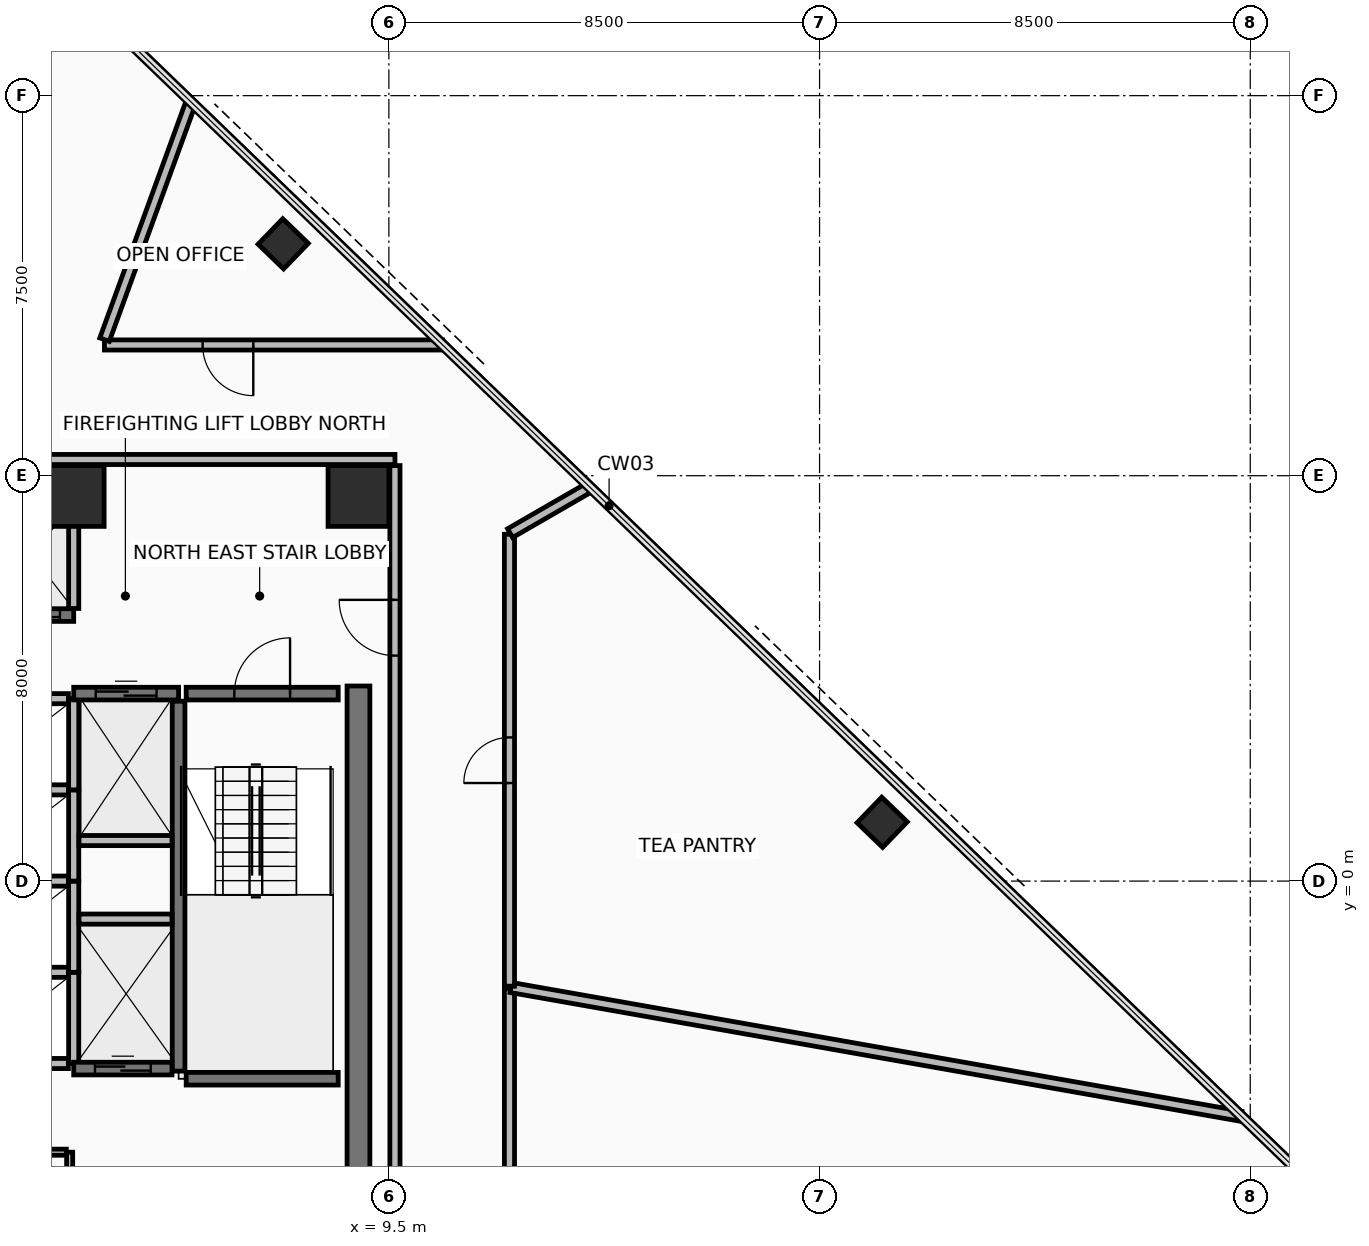
"""IFC4 building model, lengths in metres.
Left out: names, types, materials, properties, quantities, classifications, styles, units other than length and angle.
Written with IfcOpenShell. Run it as: python <this file> out.ifc"""

import sys

from ifc_helpers import new_model, si_unit, direction, frame, frame_2d, origin, origin_2d, place, context, subcontext, project, spatial, rectangle, hollow_rectangle, extrude, element, fill, save


model = new_model("IFC4")
c1 = context("Model", 3, precision=1e-05, world=origin(), true_north=direction((0.0, 1.0)))
c2 = subcontext(c1, "Body", "Model", "MODEL_VIEW")
j1 = project(units=[si_unit("LENGTHUNIT", "METRE"), si_unit("PLANEANGLEUNIT", "RADIAN")], contexts=[c1])
p1 = place(None, origin())
s1 = spatial("IfcSite", under=j1, at=p1, CompositionType="ELEMENT")
p2 = place(p1, origin())
s2 = spatial("IfcBuilding", under=s1, at=p2, CompositionType="ELEMENT")
p3 = place(p2, frame((0.0, 0.0, 89.7)))
s3 = spatial("IfcBuildingStorey", under=s2, at=p3, CompositionType="ELEMENT", Elevation=89.7)
for number, where, z_axis, x_axis in (
    (1, (8.9, 7.6, 0.0), (0.0, 0.0, 1.0), (1.0, 0.0, 0.0)),
    (2, (3.28, 7.6, 0.0), (0.0, 0.0, 1.0), (1.0, 0.0, 0.0)),
):
    element("IfcColumn", number, at=place(p3, frame(where, z_axis=z_axis, x_axis=x_axis)), inside=s3, PredefinedType="COLUMN", context=c2, shape_type="SweptSolid", body=[
        extrude(rectangle(XDim=1.2, YDim=1.2, at=origin_2d()), origin(), (0.0, 0.0, 1.0), 3.6),
    ])
for number, where, z_axis, x_axis in (
    (3, (19.236, 1.16, 0.0), (0.0, 0.0, 1.0), (-0.719, 0.695, 0.0)),
    (4, (7.415, 12.576, 0.0), (0.0, 0.0, 1.0), (-0.719, 0.695, 0.0)),
):
    element("IfcColumn", number, at=place(p3, frame(where, z_axis=z_axis, x_axis=x_axis)), inside=s3, PredefinedType="COLUMN", context=c2, shape_type="SweptSolid", body=[
        extrude(hollow_rectangle(XDim=0.7, YDim=0.7, WallThickness=0.04, at=origin_2d()), origin(), (0.0, 0.0, 1.0), 3.6),
    ])
p4 = place(p3, frame((8.9, -6.85, 0.0), z_axis=(0.0, 0.0, 1.0), x_axis=(0.0, 1.0, 0.0)))
e5 = element("IfcWall", 5, at=p4, inside=s3, PredefinedType="SHEAR", context=c2, shape_type="SweptSolid", body=[
    extrude(rectangle(XDim=10.7, YDim=0.45, at=frame_2d((5.35, 0.0))), origin(), (0.0, 0.0, 1.0), 3.41),
])
p5 = place(p3, frame((9.62, 8.32, 0.0), z_axis=(0.0, 0.0, 1.0), x_axis=(-1.0, 0.0, 0.0)))
e6 = element("IfcWall", 6, at=p5, inside=s3, PredefinedType="PARTITIONING", context=c2, shape_type="SweptSolid", body=[
    extrude(rectangle(XDim=19.24, YDim=0.2, at=frame_2d((9.62, 0.0))), origin(), (0.0, 0.0, 1.0), 2.755),
])
p6 = place(p5, frame((15.02, 0.0, 0.0)))
e7 = element("IfcOpeningElement", 7, at=p6, cuts=e6, PredefinedType="OPENING", context=c2, shape_type="SweptSolid", body=[
    extrude(rectangle(XDim=0.9, YDim=2.1, at=frame_2d((0.45, 1.05))), frame((0.0, 0.11, 0.0), z_axis=(0.0, -1.0, 0.0), x_axis=(1.0, 0.0, 0.0)), (0.0, 0.0, 1.0), 0.22),
])
p7 = place(p3, frame((9.62, -8.2, 0.0), z_axis=(0.0, 0.0, 1.0), x_axis=(0.0, 1.0, 0.0)))
e8 = element("IfcWall", 8, at=p7, inside=s3, PredefinedType="PARTITIONING", context=c2, shape_type="SweptSolid", body=[
    extrude(rectangle(XDim=16.4, YDim=0.2, at=frame_2d((8.2, 0.0))), origin(), (0.0, 0.0, 1.0), 2.805),
])
p8 = place(p7, frame((12.65, 0.0, 0.0)))
e9 = element("IfcOpeningElement", 9, at=p8, cuts=e8, PredefinedType="OPENING", context=c2, shape_type="SweptSolid", body=[
    extrude(rectangle(XDim=1.1, YDim=2.15, at=frame_2d((0.55, 1.075))), frame((0.0, 0.11, 0.0), z_axis=(0.0, -1.0, 0.0), x_axis=(1.0, 0.0, 0.0)), (0.0, 0.0, 1.0), 0.22),
])
p9 = place(p3, frame((5.35, -3.75, 0.0), z_axis=(0.0, 0.0, 1.0), x_axis=(0.0, 1.0, 0.0)))
e10 = element("IfcWall", 10, at=p9, inside=s3, PredefinedType="SHEAR", context=c2, shape_type="SweptSolid", body=[
    extrude(rectangle(XDim=7.3, YDim=0.25, at=frame_2d((3.65, 0.0))), origin(), (0.0, 0.0, 1.0), 3.41),
])
p10 = place(p3, frame((5.5, 3.7, 0.0), z_axis=(0.0, 0.0, 1.0), x_axis=(1.0, 0.0, 0.0)))
e11 = element("IfcWall", 11, at=p10, inside=s3, PredefinedType="SHEAR", context=c2, shape_type="SweptSolid", body=[
    extrude(rectangle(XDim=3.0, YDim=0.25, at=frame_2d((1.5, 0.0))), origin(), (0.0, 0.0, 1.0), 3.41),
])
p11 = place(p10, frame((0.95, 0.0, 0.0)))
e12 = element("IfcOpeningElement", 12, at=p11, cuts=e11, PredefinedType="OPENING", context=c2, shape_type="SweptSolid", body=[
    extrude(rectangle(XDim=1.1, YDim=2.15, at=frame_2d((0.55, 1.075))), frame((0.0, 0.135, 0.0), z_axis=(0.0, -1.0, 0.0), x_axis=(1.0, 0.0, 0.0)), (0.0, 0.0, 1.0), 0.27),
])
p12 = place(p3, frame((5.5, -3.9, 0.0), z_axis=(0.0, 0.0, 1.0), x_axis=(1.0, 0.0, 0.0)))
e13 = element("IfcWall", 13, at=p12, inside=s3, PredefinedType="SHEAR", context=c2, shape_type="SweptSolid", body=[
    extrude(rectangle(XDim=3.0, YDim=0.25, at=frame_2d((1.5, 0.0))), origin(), (0.0, 0.0, 1.0), 3.41),
])
p13 = place(p3, frame((1.637, 5.25, 0.0), z_axis=(0.0, 0.0, 1.0), x_axis=(1.0, 0.0, 0.0)))
e14 = element("IfcWall", 14, at=p13, inside=s3, PredefinedType="SHEAR", context=c2, shape_type="SweptSolid", body=[
    extrude(rectangle(XDim=1.643, YDim=0.25, at=frame_2d((0.821, 0.0))), origin(), (0.0, 0.0, 1.0), 3.41),
])
p14 = place(p13, frame((0.271, 0.0, 0.0)))
e15 = element("IfcOpeningElement", 15, at=p14, cuts=e14, PredefinedType="OPENING", context=c2, shape_type="SweptSolid", body=[
    extrude(rectangle(XDim=1.1, YDim=2.2, at=frame_2d((0.55, 1.1))), frame((0.0, 0.135, 0.0), z_axis=(0.0, -1.0, 0.0), x_axis=(1.0, 0.0, 0.0)), (0.0, 0.0, 1.0), 0.27),
])
p15 = place(p3, frame((2.58, 7.6, 0.0), z_axis=(0.0, 0.0, 1.0), x_axis=(1.0, 0.0, 0.0)))
e16 = element("IfcWall", 16, at=p15, inside=s3, PredefinedType="PARTITIONING", context=c2, shape_type="SweptSolid", body=[
    extrude(rectangle(XDim=0.7, YDim=0.2, at=frame_2d((0.35, 0.0))), origin(), (0.0, 0.0, 1.0), 2.605),
])
p16 = place(p3, frame((3.28, 5.38, 0.0), z_axis=(0.0, 0.0, 1.0), x_axis=(0.0, 1.0, 0.0)))
e17 = element("IfcWall", 17, at=p16, inside=s3, PredefinedType="PARTITIONING", context=c2, shape_type="SweptSolid", body=[
    extrude(rectangle(XDim=2.115, YDim=0.2, at=frame_2d((1.058, 0.0))), origin(), (0.0, 0.0, 1.0), 2.605),
])
p17 = place(p3, frame((3.28, -3.6, 0.0), z_axis=(0.0, 0.0, 1.0), x_axis=(0.0, 1.0, 0.0)))
e18 = element("IfcWall", 18, at=p17, inside=s3, PredefinedType="PARTITIONING", context=c2, shape_type="SweptSolid", body=[
    extrude(rectangle(XDim=1.8, YDim=0.2, at=frame_2d((0.9, 0.0))), origin(), (0.0, 0.0, 1.0), 3.41),
])
for number, where, z_axis, x_axis in (
    (19, (1.13, -3.6, 0.0), (0.0, 0.0, 1.0), (1.0, 0.0, 0.0)),
    (20, (1.13, -1.8, 0.0), (0.0, 0.0, 1.0), (1.0, 0.0, 0.0)),
):
    element("IfcWall", number, at=place(p3, frame(where, z_axis=z_axis, x_axis=x_axis)), inside=s3, PredefinedType="PARTITIONING", context=c2, shape_type="SweptSolid", body=[
        extrude(rectangle(XDim=2.045, YDim=0.2, at=frame_2d((1.022, 0.0))), origin(), (0.0, 0.0, 1.0), 3.41),
    ])
p18 = place(p3, frame((3.28, -1.8, 0.0), z_axis=(0.0, 0.0, 1.0), x_axis=(0.0, 1.0, 0.0)))
e21 = element("IfcWall", 21, at=p18, inside=s3, PredefinedType="PARTITIONING", context=c2, shape_type="SweptSolid", body=[
    extrude(rectangle(XDim=1.8, YDim=0.2, at=frame_2d((0.9, 0.0))), origin(), (0.0, 0.0, 1.0), 3.41),
])
p19 = place(p3, frame((1.13, 0.0, 0.0), z_axis=(0.0, 0.0, 1.0), x_axis=(1.0, 0.0, 0.0)))
e22 = element("IfcWall", 22, at=p19, inside=s3, PredefinedType="PARTITIONING", context=c2, shape_type="SweptSolid", body=[
    extrude(rectangle(XDim=2.045, YDim=0.2, at=frame_2d((1.022, 0.0))), origin(), (0.0, 0.0, 1.0), 3.41),
])
p20 = place(p3, frame((3.28, 0.0, 0.0), z_axis=(0.0, 0.0, 1.0), x_axis=(0.0, 1.0, 0.0)))
e23 = element("IfcWall", 23, at=p20, inside=s3, PredefinedType="PARTITIONING", context=c2, shape_type="SweptSolid", body=[
    extrude(rectangle(XDim=1.8, YDim=0.2, at=frame_2d((0.9, 0.0))), origin(), (0.0, 0.0, 1.0), 3.41),
])
p21 = place(p3, frame((1.13, 1.8, 0.0), z_axis=(0.0, 0.0, 1.0), x_axis=(1.0, 0.0, 0.0)))
e24 = element("IfcWall", 24, at=p21, inside=s3, PredefinedType="PARTITIONING", context=c2, shape_type="SweptSolid", body=[
    extrude(rectangle(XDim=2.045, YDim=0.2, at=frame_2d((1.022, 0.0))), origin(), (0.0, 0.0, 1.0), 3.41),
])
p22 = place(p3, frame((3.28, 1.8, 0.0), z_axis=(0.0, 0.0, 1.0), x_axis=(0.0, 1.0, 0.0)))
e25 = element("IfcWall", 25, at=p22, inside=s3, PredefinedType="PARTITIONING", context=c2, shape_type="SweptSolid", body=[
    extrude(rectangle(XDim=1.8, YDim=0.2, at=frame_2d((0.9, 0.0))), origin(), (0.0, 0.0, 1.0), 3.41),
])
p23 = place(p3, frame((1.13, 3.6, 0.0), z_axis=(0.0, 0.0, 1.0), x_axis=(1.0, 0.0, 0.0)))
e26 = element("IfcWall", 26, at=p23, inside=s3, PredefinedType="PARTITIONING", context=c2, shape_type="SweptSolid", body=[
    extrude(rectangle(XDim=2.045, YDim=0.2, at=frame_2d((1.022, 0.0))), origin(), (0.0, 0.0, 1.0), 2.605),
])
p24 = place(p3, frame((3.28, 3.7, 0.0), z_axis=(0.0, 0.0, 1.0), x_axis=(1.0, 0.0, 0.0)))
e27 = element("IfcWall", 27, at=p24, inside=s3, PredefinedType="SHEAR", context=c2, shape_type="SweptSolid", body=[
    extrude(rectangle(XDim=2.07, YDim=0.25, at=frame_2d((1.035, 0.0))), origin(), (0.0, 0.0, 1.0), 3.41),
])
p25 = place(p24, frame((0.435, 0.0, 0.0)))
e28 = element("IfcOpeningElement", 28, at=p25, cuts=e27, PredefinedType="OPENING", context=c2, shape_type="SweptSolid", body=[
    extrude(rectangle(XDim=1.2, YDim=2.2, at=frame_2d((0.6, 1.1))), frame((0.0, 0.135, 0.0), z_axis=(0.0, -1.0, 0.0), x_axis=(1.0, 0.0, 0.0)), (0.0, 0.0, 1.0), 0.27),
])
p26 = place(p3, frame((3.385, 0.8, 0.0), z_axis=(0.0, 0.0, 1.0), x_axis=(1.0, 0.0, 0.0)))
e29 = element("IfcWall", 29, at=p26, inside=s3, PredefinedType="PARTITIONING", context=c2, shape_type="SweptSolid", body=[
    extrude(rectangle(XDim=1.835, YDim=0.2, at=frame_2d((0.917, 0.0))), origin(), (0.0, 0.0, 1.0), 3.41),
])
p27 = place(p3, frame((3.28, -3.7, 0.0), z_axis=(0.0, 0.0, 1.0), x_axis=(1.0, 0.0, 0.0)))
e30 = element("IfcWall", 30, at=p27, inside=s3, PredefinedType="SHEAR", context=c2, shape_type="SweptSolid", body=[
    extrude(rectangle(XDim=1.94, YDim=0.25, at=frame_2d((0.97, 0.0))), origin(), (0.0, 0.0, 1.0), 3.41),
])
p28 = place(p27, frame((0.42, 0.0, 0.0)))
e31 = element("IfcOpeningElement", 31, at=p28, cuts=e30, PredefinedType="OPENING", context=c2, shape_type="SweptSolid", body=[
    extrude(rectangle(XDim=1.1, YDim=2.2, at=frame_2d((0.55, 1.1))), frame((0.0, 0.135, 0.0), z_axis=(0.0, -1.0, 0.0), x_axis=(1.0, 0.0, 0.0)), (0.0, 0.0, 1.0), 0.27),
])
p29 = place(p3, frame((3.385, -0.75, 0.0), z_axis=(0.0, 0.0, 1.0), x_axis=(1.0, 0.0, 0.0)))
e32 = element("IfcWall", 32, at=p29, inside=s3, PredefinedType="PARTITIONING", context=c2, shape_type="SweptSolid", body=[
    extrude(rectangle(XDim=1.835, YDim=0.2, at=frame_2d((0.917, 0.0))), origin(), (0.0, 0.0, 1.0), 3.41),
])
p30 = place(p3, frame((3.2, -8.215, 0.0), z_axis=(0.0, 0.0, 1.0), x_axis=(0.0, 1.0, 0.0)))
e33 = element("IfcWall", 33, at=p30, inside=s3, PredefinedType="PARTITIONING", context=c2, shape_type="SweptSolid", body=[
    extrude(rectangle(XDim=2.865, YDim=0.12, at=frame_2d((1.433, 0.0))), origin(), (0.0, 0.0, 1.0), 2.605),
])
p31 = place(p3, frame((3.135, -5.35, 0.0), z_axis=(0.0, 0.0, 1.0), x_axis=(-1.0, 0.0, 0.0)))
e34 = element("IfcWall", 34, at=p31, inside=s3, PredefinedType="PARTITIONING", context=c2, shape_type="SweptSolid", body=[
    extrude(rectangle(XDim=3.135, YDim=0.12, at=frame_2d((1.567, 0.0))), origin(), (0.0, 0.0, 1.0), 3.41),
])
p32 = place(p3, frame((10.561, 10.58, 0.0), z_axis=(0.0, 0.0, 1.0), x_axis=(-1.0, 0.0, 0.0)))
e35 = element("IfcWall", 35, at=p32, inside=s3, PredefinedType="PARTITIONING", context=c2, shape_type="SweptSolid", body=[
    extrude(rectangle(XDim=6.675, YDim=0.2, at=frame_2d((3.337, 0.0))), origin(), (0.0, 0.0, 1.0), 2.605),
])
p33 = place(p32, frame((3.737, 0.0, 0.0)))
e36 = element("IfcOpeningElement", 36, at=p33, cuts=e35, PredefinedType="OPENING", context=c2, shape_type="SweptSolid", body=[
    extrude(rectangle(XDim=1.0, YDim=2.15, at=frame_2d((0.5, 1.075))), frame((0.0, 0.11, 0.0), z_axis=(0.0, -1.0, 0.0), x_axis=(1.0, 0.0, 0.0)), (0.0, 0.0, 1.0), 0.22),
])
p34 = place(p3, frame((3.889, 10.685, 0.0), z_axis=(0.0, 0.0, 1.0), x_axis=(0.342025836352, 0.939690548674, 0.0)))
e37 = element("IfcWall", 37, at=p34, inside=s3, PredefinedType="PARTITIONING", context=c2, shape_type="SweptSolid", body=[
    extrude(rectangle(XDim=4.991, YDim=0.2, at=frame_2d((2.496, 0.0))), origin(), (0.0, 0.0, 1.0), 2.605),
])
p35 = place(p3, frame((11.88, -10.579, 0.0), z_axis=(0.0, 0.0, 1.0), x_axis=(0.0, 1.0, 0.0)))
e38 = element("IfcWall", 38, at=p35, inside=s3, PredefinedType="PARTITIONING", context=c2, shape_type="SweptSolid", body=[
    extrude(rectangle(XDim=8.455, YDim=0.2, at=frame_2d((4.228, 0.0))), origin(), (0.0, 0.0, 1.0), 2.805),
])
p36 = place(p35, frame((3.727, 0.0, 0.0)))
e39 = element("IfcOpeningElement", 39, at=p36, cuts=e38, PredefinedType="OPENING", context=c2, shape_type="SweptSolid", body=[
    extrude(rectangle(XDim=1.0, YDim=2.15, at=frame_2d((0.5, 1.075))), frame((0.0, 0.11, 0.0), z_axis=(0.0, -1.0, 0.0), x_axis=(1.0, 0.0, 0.0)), (0.0, 0.0, 1.0), 0.22),
])
p37 = place(p3, frame((11.909, -2.1, 0.0), z_axis=(0.0, 0.0, 1.0), x_axis=(0.984806062871, -0.173657762662, 0.0)))
e40 = element("IfcWall", 40, at=p37, inside=s3, PredefinedType="PARTITIONING", context=c2, shape_type="SweptSolid", body=[
    extrude(rectangle(XDim=14.629, YDim=0.2, at=frame_2d((7.315, 0.0))), origin(), (0.0, 0.0, 1.0), 2.605),
])
p38 = place(p3, frame((11.88, -2.074, 0.0), z_axis=(0.0, 0.0, 1.0), x_axis=(0.0, 1.0, 0.0)))
e41 = element("IfcWall", 41, at=p38, inside=s3, PredefinedType="PARTITIONING", context=c2, shape_type="SweptSolid", body=[
    extrude(rectangle(XDim=8.918, YDim=0.2, at=frame_2d((4.459, 0.0))), origin(), (0.0, 0.0, 1.0), 2.805),
])
p39 = place(p38, frame((4.009, 0.0, 0.0)))
e42 = element("IfcOpeningElement", 42, at=p39, cuts=e41, PredefinedType="OPENING", context=c2, shape_type="SweptSolid", body=[
    extrude(rectangle(XDim=0.9, YDim=2.1, at=frame_2d((0.45, 1.05))), frame((0.0, 0.11, 0.0), z_axis=(0.0, -1.0, 0.0), x_axis=(1.0, 0.0, 0.0)), (0.0, 0.0, 1.0), 0.22),
])
p40 = place(p3, frame((11.893, 6.866, 0.0), z_axis=(0.0, 0.0, 1.0), x_axis=(0.866020546064, 0.500008413725, 0.0)))
e43 = element("IfcWall", 43, at=p40, inside=s3, PredefinedType="PARTITIONING", context=c2, shape_type="SweptSolid", body=[
    extrude(rectangle(XDim=1.798, YDim=0.2, at=frame_2d((0.899, 0.0))), origin(), (0.0, 0.0, 1.0), 2.605),
])
p41 = place(p8, frame((1.1, 0.0, 0.0), z_axis=(0.0, 0.0, 1.0), x_axis=(-1.0, 0.0, 0.0)))
e44 = element("IfcDoor", 44, at=p41, inside=s3, OperationType="SINGLE_SWING_LEFT", PredefinedType="DOOR", context=c2, shape_type="SweptSolid", body=[
    extrude(rectangle(XDim=1.1, YDim=2.15, at=frame_2d((0.55, 1.075))), frame((0.0, 0.025, 0.0), z_axis=(0.0, -1.0, 0.0), x_axis=(1.0, 0.0, 0.0)), (0.0, 0.0, 1.0), 0.05),
])
fill(e9, e44)
p42 = place(p11, frame((1.1, 0.0, 0.0), z_axis=(0.0, 0.0, 1.0), x_axis=(-1.0, 0.0, 0.0)))
e45 = element("IfcDoor", 45, at=p42, inside=s3, OperationType="SINGLE_SWING_LEFT", PredefinedType="DOOR", context=c2, shape_type="SweptSolid", body=[
    extrude(rectangle(XDim=1.1, YDim=2.15, at=frame_2d((0.55, 1.075))), frame((0.0, 0.025, 0.0), z_axis=(0.0, -1.0, 0.0), x_axis=(1.0, 0.0, 0.0)), (0.0, 0.0, 1.0), 0.05),
])
fill(e12, e45)
p43 = place(p14, origin())
e46 = element("IfcDoor", 46, at=p43, inside=s3, OperationType="SLIDING_TO_LEFT", PredefinedType="DOOR", context=c2, shape_type="SweptSolid", body=[
    extrude(rectangle(XDim=1.1, YDim=2.2, at=frame_2d((0.55, 1.1))), frame((0.0, 0.025, 0.0), z_axis=(0.0, -1.0, 0.0), x_axis=(1.0, 0.0, 0.0)), (0.0, 0.0, 1.0), 0.05),
])
fill(e15, e46)
p44 = place(p25, origin())
e47 = element("IfcDoor", 47, at=p44, inside=s3, OperationType="SLIDING_TO_RIGHT", PredefinedType="DOOR", context=c2, shape_type="SweptSolid", body=[
    extrude(rectangle(XDim=1.2, YDim=2.2, at=frame_2d((0.6, 1.1))), frame((0.0, 0.025, 0.0), z_axis=(0.0, -1.0, 0.0), x_axis=(1.0, 0.0, 0.0)), (0.0, 0.0, 1.0), 0.05),
])
fill(e28, e47)
p45 = place(p28, origin())
e48 = element("IfcDoor", 48, at=p45, inside=s3, OperationType="SLIDING_TO_LEFT", PredefinedType="DOOR", context=c2, shape_type="SweptSolid", body=[
    extrude(rectangle(XDim=1.1, YDim=2.2, at=frame_2d((0.55, 1.1))), frame((0.0, 0.025, 0.0), z_axis=(0.0, -1.0, 0.0), x_axis=(1.0, 0.0, 0.0)), (0.0, 0.0, 1.0), 0.05),
])
fill(e31, e48)
p46 = place(p33, origin())
e49 = element("IfcDoor", 49, at=p46, inside=s3, OperationType="SINGLE_SWING_RIGHT", PredefinedType="DOOR", context=c2, shape_type="SweptSolid", body=[
    extrude(rectangle(XDim=1.0, YDim=2.15, at=frame_2d((0.5, 1.075))), frame((0.0, 0.025, 0.0), z_axis=(0.0, -1.0, 0.0), x_axis=(1.0, 0.0, 0.0)), (0.0, 0.0, 1.0), 0.05),
])
fill(e36, e49)
p47 = place(p39, origin())
e50 = element("IfcDoor", 50, at=p47, inside=s3, OperationType="SINGLE_SWING_LEFT", PredefinedType="DOOR", context=c2, shape_type="SweptSolid", body=[
    extrude(rectangle(XDim=0.9, YDim=2.1, at=frame_2d((0.45, 1.05))), frame((0.0, 0.025, 0.0), z_axis=(0.0, -1.0, 0.0), x_axis=(1.0, 0.0, 0.0)), (0.0, 0.0, 1.0), 0.05),
])
fill(e42, e50)
save(model, sys.argv[1])
